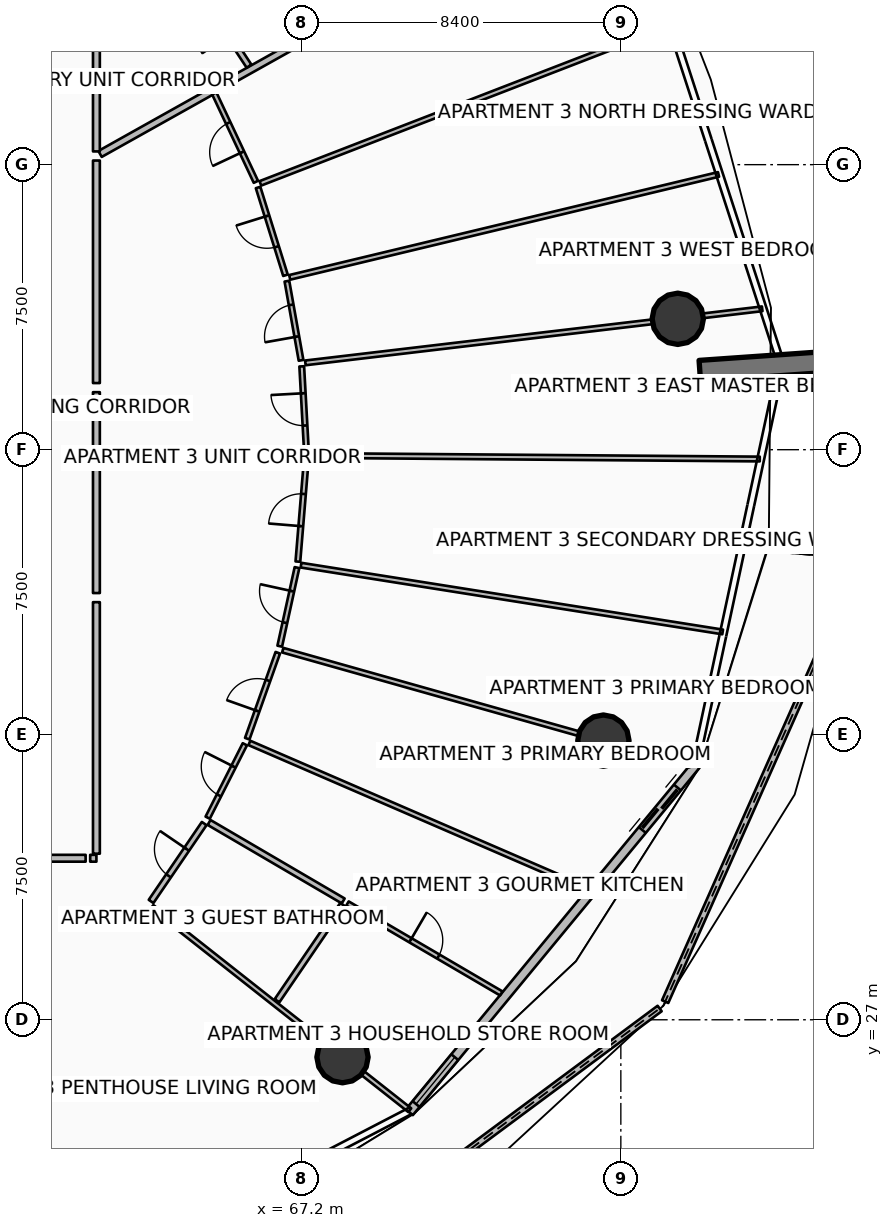
"""IFC4 building model, lengths in metres.
Left out: names, types, materials, properties, quantities, classifications, styles, units other than length and angle.
Written with IfcOpenShell. Run it as: python <this file> out.ifc"""

import sys

from ifc_helpers import new_model, si_unit, direction, frame, frame_2d, origin, origin_2d, place, context, subcontext, project, spatial, polyline, rectangle, circle, outline, extrude, element, fill, save


model = new_model("IFC4")
c1 = context("Model", 3, precision=1e-05, world=origin(), true_north=direction((0.0, 1.0)))
c2 = subcontext(c1, "Body", "Model", "MODEL_VIEW")
j1 = project(units=[si_unit("LENGTHUNIT", "METRE"), si_unit("PLANEANGLEUNIT", "RADIAN")], contexts=[c1])
p1 = place(None, origin())
s1 = spatial("IfcSite", under=j1, at=p1, CompositionType="ELEMENT")
p2 = place(p1, origin())
s2 = spatial("IfcBuilding", under=s1, at=p2, CompositionType="ELEMENT")
p3 = place(p2, frame((0.0, 0.0, 60.15)))
s3 = spatial("IfcBuildingStorey", under=s2, at=p3, CompositionType="ELEMENT", Elevation=60.15)
p4 = place(p3, frame((77.678, 44.075, 0.0), z_axis=(0.0, 0.0, 1.0), x_axis=(0.997564163539, 0.069754853754, 0.0)))
e1 = element("IfcWall", 1, at=p4, inside=s3, PredefinedType="SOLIDWALL", context=c2, shape_type="SweptSolid", body=[
    extrude(rectangle(XDim=3.5, YDim=0.55, at=frame_2d((1.75, 0.0))), origin(), (0.0, 0.0, 1.0), 3.75),
])
for number, where, z_axis, x_axis in (
    (2, (68.276, 26.016, 0.0), (0.0, 0.0, 1.0), (1.0, 0.0, 0.0)),
    (3, (75.141, 34.345, 0.0), (0.0, 0.0, 1.0), (1.0, 0.0, 0.0)),
    (4, (77.098, 45.444, 0.0), (0.0, 0.0, 1.0), (1.0, 0.0, 0.0)),
):
    element("IfcColumn", number, at=place(p3, frame(where, z_axis=z_axis, x_axis=x_axis)), inside=s3, PredefinedType="COLUMN", context=c2, shape_type="SweptSolid", body=[
        extrude(circle(Radius=0.675, at=origin_2d()), origin(), (0.0, 0.0, 1.0), 3.5),
    ])
p5 = place(p3, frame((66.933, 20.104, 0.0), z_axis=(0.0, 0.0, 1.0), x_axis=(0.802947764501, 0.596049400204, 0.0)))
e5 = element("IfcWall", 5, at=p5, inside=s3, PredefinedType="PARAPET", context=c2, shape_type="SweptSolid", body=[
    extrude(outline(polyline([(0.0, 0.0), (12.065, 0.0), (12.066, 1.832), (6.033, 1.696), (0.0, 1.497), (0.0, 0.0)])), frame((0.0, 0.09, 0.0), z_axis=(0.0, -1.0, 0.0), x_axis=(1.0, 0.0, 0.0)), (0.0, 0.0, 1.0), 0.18),
])
p6 = place(p3, frame((76.766, 27.477, 0.0), z_axis=(0.0, 0.0, 1.0), x_axis=(0.405953542593, 0.91389371442, 0.0)))
e6 = element("IfcWall", 6, at=p6, inside=s3, PredefinedType="PARAPET", context=c2, shape_type="SweptSolid", body=[
    extrude(outline(polyline([(0.0, 0.0), (12.74, 0.0), (12.74, 1.756), (6.37, 1.853), (0.0, 1.832), (0.0, 0.0)])), frame((0.0, 0.09, 0.0), z_axis=(0.0, -1.0, 0.0), x_axis=(1.0, 0.0, 0.0)), (0.0, 0.0, 1.0), 0.18),
])
p7 = place(p3, frame((70.033, 24.567, 0.0), z_axis=(0.0, 0.0, 1.0), x_axis=(0.636674332663, 0.771132799281, 0.0)))
e7 = element("IfcWall", 7, at=p7, inside=s3, PredefinedType="SOLIDWALL", context=c2, shape_type="SweptSolid", body=[
    extrude(rectangle(XDim=11.851, YDim=0.24, at=frame_2d((5.926, 0.0))), origin(), (0.0, 0.0, 1.0), 2.45),
])
p8 = place(p7, frame((9.631, 0.0, 0.0)))
e8 = element("IfcOpeningElement", 8, at=p8, cuts=e7, PredefinedType="OPENING", context=c2, shape_type="SweptSolid", body=[
    extrude(rectangle(XDim=1.45, YDim=2.15, at=frame_2d((0.725, 1.075))), frame((0.0, 0.13, 0.0), z_axis=(0.0, -1.0, 0.0), x_axis=(1.0, 0.0, 0.0)), (0.0, 0.0, 1.0), 0.26),
])
p9 = place(p7, frame((0.28, 0.0, 0.65)))
e9 = element("IfcOpeningElement", 9, at=p9, cuts=e7, PredefinedType="OPENING", context=c2, shape_type="SweptSolid", body=[
    extrude(rectangle(XDim=1.6, YDim=1.5, at=frame_2d((0.8, 0.75))), frame((0.0, 0.13, 0.0), z_axis=(0.0, -1.0, 0.0), x_axis=(1.0, 0.0, 0.0)), (0.0, 0.0, 1.0), 0.26),
])
p10 = place(p3, frame((61.896, 49.782, 0.0), z_axis=(0.0, 0.0, 1.0), x_axis=(0.872493215695, 0.488626225828, 0.0)))
e10 = element("IfcWall", 10, at=p10, inside=s3, PredefinedType="PARTITIONING", context=c2, shape_type="SweptSolid", body=[
    extrude(rectangle(XDim=15.612, YDim=0.18, at=frame_2d((7.806, 0.0))), origin(), (0.0, 0.0, 1.0), 2.867),
])
p11 = place(p3, frame((54.14, 31.25, 0.0), z_axis=(0.0, 0.0, 1.0), x_axis=(1.0, 0.0, 0.0)))
e11 = element("IfcWall", 11, at=p11, inside=s3, PredefinedType="PARTITIONING", context=c2, shape_type="SweptSolid", body=[
    extrude(rectangle(XDim=7.376, YDim=0.18, at=frame_2d((3.688, 0.0))), origin(), (0.0, 0.0, 1.0), 2.867),
])
p12 = place(p11, frame((3.138, 0.0, 0.0)))
e12 = element("IfcOpeningElement", 12, at=p12, cuts=e11, PredefinedType="OPENING", context=c2, shape_type="SweptSolid", body=[
    extrude(rectangle(XDim=1.1, YDim=2.1, at=frame_2d((0.55, 1.05))), frame((0.0, 0.1, 0.0), z_axis=(0.0, -1.0, 0.0), x_axis=(1.0, 0.0, 0.0)), (0.0, 0.0, 1.0), 0.2),
])
p13 = place(p3, frame((61.636, 31.25, 0.0), z_axis=(0.0, 0.0, 1.0), x_axis=(1.0, 0.0, 0.0)))
e13 = element("IfcWall", 13, at=p13, inside=s3, PredefinedType="PARTITIONING", context=c2, shape_type="SweptSolid", body=[
    extrude(rectangle(XDim=0.164, YDim=0.18, at=frame_2d((0.082, 0.0))), origin(), (0.0, 0.0, 1.0), 2.867),
])
p14 = place(p3, frame((61.8, 31.37, 0.0), z_axis=(0.0, 0.0, 1.0), x_axis=(0.0, 1.0, 0.0)))
e14 = element("IfcWall", 14, at=p14, inside=s3, PredefinedType="PARTITIONING", context=c2, shape_type="SweptSolid", body=[
    extrude(rectangle(XDim=6.618, YDim=0.18, at=frame_2d((3.309, 0.0))), origin(), (0.0, 0.0, 1.0), 2.867),
])
p15 = place(p3, frame((63.261, 29.969, 0.0), z_axis=(0.0, 0.0, 1.0), x_axis=(0.78531804627, -0.619092534443, 0.0)))
e15 = element("IfcWall", 15, at=p15, inside=s3, PredefinedType="PARTITIONING", context=c2, shape_type="SweptSolid", body=[
    extrude(rectangle(XDim=8.639, YDim=0.125, at=frame_2d((4.32, 0.0))), origin(), (0.0, 0.0, 1.0), 2.867),
])
p16 = place(p3, frame((63.239, 30.114, 0.0), z_axis=(0.0, 0.0, 1.0), x_axis=(0.563437614894, 0.826158613174, 0.0)))
e16 = element("IfcWall", 16, at=p16, inside=s3, PredefinedType="PARTITIONING", context=c2, shape_type="SweptSolid", body=[
    extrude(rectangle(XDim=2.48, YDim=0.15, at=frame_2d((1.24, 0.0))), origin(), (0.0, 0.0, 1.0), 2.867),
])
p17 = place(p16, frame((0.815, 0.0, 0.0)))
e17 = element("IfcOpeningElement", 17, at=p17, cuts=e16, PredefinedType="OPENING", context=c2, shape_type="SweptSolid", body=[
    extrude(rectangle(XDim=0.85, YDim=2.06, at=frame_2d((0.425, 1.03))), frame((0.0, 0.085, 0.0), z_axis=(0.0, -1.0, 0.0), x_axis=(1.0, 0.0, 0.0)), (0.0, 0.0, 1.0), 0.17),
])
p18 = place(p3, frame((66.553, 27.501, 0.0), z_axis=(0.0, 0.0, 1.0), x_axis=(0.563388764178, 0.826191927095, 0.0)))
e18 = element("IfcWall", 18, at=p18, inside=s3, PredefinedType="PARTITIONING", context=c2, shape_type="SweptSolid", body=[
    extrude(rectangle(XDim=3.063, YDim=0.15, at=frame_2d((1.531, 0.0))), origin(), (0.0, 0.0, 1.0), 2.867),
])
p19 = place(p3, frame((64.765, 32.192, 0.0), z_axis=(0.0, 0.0, 1.0), x_axis=(0.863128698129, -0.504984010109, 0.0)))
e19 = element("IfcWall", 19, at=p19, inside=s3, PredefinedType="PARTITIONING", context=c2, shape_type="SweptSolid", body=[
    extrude(rectangle(XDim=4.09, YDim=0.15, at=frame_2d((2.045, 0.0))), origin(), (0.0, 0.0, 1.0), 2.94),
])
p20 = place(p3, frame((68.407, 30.061, 0.0), z_axis=(0.0, 0.0, 1.0), x_axis=(0.863132370473, -0.504977733214, 0.0)))
e20 = element("IfcWall", 20, at=p20, inside=s3, PredefinedType="PARTITIONING", context=c2, shape_type="SweptSolid", body=[
    extrude(rectangle(XDim=4.689, YDim=0.125, at=frame_2d((2.345, 0.0))), origin(), (0.0, 0.0, 1.0), 2.94),
])
p21 = place(p20, frame((1.919, 0.0, 0.0)))
e21 = element("IfcOpeningElement", 21, at=p21, cuts=e20, PredefinedType="OPENING", context=c2, shape_type="SweptSolid", body=[
    extrude(rectangle(XDim=0.85, YDim=2.06, at=frame_2d((0.425, 1.03))), frame((0.0, 0.073, 0.0), z_axis=(0.0, -1.0, 0.0), x_axis=(1.0, 0.0, 0.0)), (0.0, 0.0, 1.0), 0.145),
])
p22 = place(p3, frame((65.825, 34.285, 0.0), z_axis=(0.0, 0.0, 1.0), x_axis=(0.917721842762, -0.39722363892, 0.0)))
e22 = element("IfcWall", 22, at=p22, inside=s3, PredefinedType="PARTITIONING", context=c2, shape_type="SweptSolid", body=[
    extrude(rectangle(XDim=9.694, YDim=0.125, at=frame_2d((4.847, 0.0))), origin(), (0.0, 0.0, 1.0), 2.94),
])
p23 = place(p3, frame((64.728, 32.317, 0.0), z_axis=(0.0, 0.0, 1.0), x_axis=(0.451897802863, 0.892069714634, 0.0)))
e23 = element("IfcWall", 23, at=p23, inside=s3, PredefinedType="PARTITIONING", context=c2, shape_type="SweptSolid", body=[
    extrude(rectangle(XDim=2.165, YDim=0.125, at=frame_2d((1.083, 0.0))), origin(), (0.0, 0.0, 1.0), 2.94),
])
p24 = place(p23, frame((0.658, 0.0, 0.0)))
e24 = element("IfcOpeningElement", 24, at=p24, cuts=e23, PredefinedType="OPENING", context=c2, shape_type="SweptSolid", body=[
    extrude(rectangle(XDim=0.85, YDim=2.06, at=frame_2d((0.425, 1.03))), frame((0.0, 0.073, 0.0), z_axis=(0.0, -1.0, 0.0), x_axis=(1.0, 0.0, 0.0)), (0.0, 0.0, 1.0), 0.145),
])
p25 = place(p3, frame((65.769, 34.396, 0.0), z_axis=(0.0, 0.0, 1.0), x_axis=(0.335079884685, 0.942189721277, 0.0)))
e25 = element("IfcWall", 25, at=p25, inside=s3, PredefinedType="PARTITIONING", context=c2, shape_type="SweptSolid", body=[
    extrude(rectangle(XDim=2.401, YDim=0.125, at=frame_2d((1.2, 0.0))), origin(), (0.0, 0.0, 1.0), 2.867),
])
p26 = place(p25, frame((0.775, 0.0, 0.0)))
e26 = element("IfcOpeningElement", 26, at=p26, cuts=e25, PredefinedType="OPENING", context=c2, shape_type="SweptSolid", body=[
    extrude(rectangle(XDim=0.85, YDim=2.06, at=frame_2d((0.425, 1.03))), frame((0.0, 0.073, 0.0), z_axis=(0.0, -1.0, 0.0), x_axis=(1.0, 0.0, 0.0)), (0.0, 0.0, 1.0), 0.145),
])
p27 = place(p3, frame((61.8, 38.228, 0.0), z_axis=(0.0, 0.0, 1.0), x_axis=(0.0, 1.0, 0.0)))
e27 = element("IfcWall", 27, at=p27, inside=s3, PredefinedType="PARTITIONING", context=c2, shape_type="SweptSolid", body=[
    extrude(rectangle(XDim=5.285, YDim=0.18, at=frame_2d((2.643, 0.0))), origin(), (0.0, 0.0, 1.0), 2.867),
])
p28 = place(p3, frame((66.703, 36.725, 0.0), z_axis=(0.0, 0.0, 1.0), x_axis=(0.962456868727, -0.271434662195, 0.0)))
e28 = element("IfcWall", 28, at=p28, inside=s3, PredefinedType="PARTITIONING", context=c2, shape_type="SweptSolid", body=[
    extrude(rectangle(XDim=11.141, YDim=0.125, at=frame_2d((5.571, 0.0))), origin(), (0.0, 0.0, 1.0), 2.867),
])
p29 = place(p3, frame((67.184, 38.962, 0.0), z_axis=(0.0, 0.0, 1.0), x_axis=(0.987685842404, -0.156450237182, 0.0)))
e29 = element("IfcWall", 29, at=p29, inside=s3, PredefinedType="PARTITIONING", context=c2, shape_type="SweptSolid", body=[
    extrude(rectangle(XDim=11.234, YDim=0.125, at=frame_2d((5.617, 0.0))), origin(), (0.0, 0.0, 1.0), 2.94),
])
p30 = place(p3, frame((67.422, 41.847, 0.0), z_axis=(0.0, 0.0, 1.0), x_axis=(0.999969106173, -0.007860451618, 0.0)))
e30 = element("IfcWall", 30, at=p30, inside=s3, PredefinedType="PARTITIONING", context=c2, shape_type="SweptSolid", body=[
    extrude(rectangle(XDim=11.833, YDim=0.125, at=frame_2d((5.917, 0.0))), origin(), (0.0, 0.0, 1.0), 2.94),
])
p31 = place(p3, frame((66.624, 36.83, 0.0), z_axis=(0.0, 0.0, 1.0), x_axis=(0.214316036982, 0.976764370917, 0.0)))
e31 = element("IfcWall", 31, at=p31, inside=s3, PredefinedType="PARTITIONING", context=c2, shape_type="SweptSolid", body=[
    extrude(rectangle(XDim=2.116, YDim=0.125, at=frame_2d((1.058, 0.0))), origin(), (0.0, 0.0, 1.0), 2.867),
])
p32 = place(p31, frame((0.633, 0.0, 0.0)))
e32 = element("IfcOpeningElement", 32, at=p32, cuts=e31, PredefinedType="OPENING", context=c2, shape_type="SweptSolid", body=[
    extrude(rectangle(XDim=0.85, YDim=2.06, at=frame_2d((0.425, 1.03))), frame((0.0, 0.073, 0.0), z_axis=(0.0, -1.0, 0.0), x_axis=(1.0, 0.0, 0.0)), (0.0, 0.0, 1.0), 0.145),
])
p33 = place(p3, frame((67.102, 39.055, 0.0), z_axis=(0.0, 0.0, 1.0), x_axis=(0.082325550285, 0.996605490538, 0.0)))
e33 = element("IfcWall", 33, at=p33, inside=s3, PredefinedType="PARTITIONING", context=c2, shape_type="SweptSolid", body=[
    extrude(rectangle(XDim=2.722, YDim=0.125, at=frame_2d((1.361, 0.0))), origin(), (0.0, 0.0, 1.0), 2.94),
])
p34 = place(p33, frame((0.936, 0.0, 0.0)))
e34 = element("IfcOpeningElement", 34, at=p34, cuts=e33, PredefinedType="OPENING", context=c2, shape_type="SweptSolid", body=[
    extrude(rectangle(XDim=0.85, YDim=2.06, at=frame_2d((0.425, 1.03))), frame((0.0, 0.073, 0.0), z_axis=(0.0, -1.0, 0.0), x_axis=(1.0, 0.0, 0.0)), (0.0, 0.0, 1.0), 0.145),
])
p35 = place(p3, frame((67.328, 41.928, 0.0), z_axis=(0.0, 0.0, 1.0), x_axis=(-0.054903584575, 0.998491660657, 0.0)))
e35 = element("IfcWall", 35, at=p35, inside=s3, PredefinedType="PARTITIONING", context=c2, shape_type="SweptSolid", body=[
    extrude(rectangle(XDim=2.268, YDim=0.125, at=frame_2d((1.134, 0.0))), origin(), (0.0, 0.0, 1.0), 2.867),
])
p36 = place(p35, frame((0.709, 0.0, 0.0)))
e36 = element("IfcOpeningElement", 36, at=p36, cuts=e35, PredefinedType="OPENING", context=c2, shape_type="SweptSolid", body=[
    extrude(rectangle(XDim=0.85, YDim=2.06, at=frame_2d((0.425, 1.03))), frame((0.0, 0.073, 0.0), z_axis=(0.0, -1.0, 0.0), x_axis=(1.0, 0.0, 0.0)), (0.0, 0.0, 1.0), 0.145),
])
p37 = place(p3, frame((61.8, 43.753, 0.0), z_axis=(0.0, 0.0, 1.0), x_axis=(0.0, 1.0, 0.0)))
e37 = element("IfcWall", 37, at=p37, inside=s3, PredefinedType="PARTITIONING", context=c2, shape_type="SweptSolid", body=[
    extrude(rectangle(XDim=5.855, YDim=0.18, at=frame_2d((2.927, 0.0))), origin(), (0.0, 0.0, 1.0), 2.867),
])
p38 = place(p3, frame((67.298, 44.284, 0.0), z_axis=(0.0, 0.0, 1.0), x_axis=(0.993068589749, 0.117536275483, 0.0)))
e38 = element("IfcWall", 38, at=p38, inside=s3, PredefinedType="PARTITIONING", context=c2, shape_type="SweptSolid", body=[
    extrude(rectangle(XDim=12.106, YDim=0.125, at=frame_2d((6.053, 0.0))), origin(), (0.0, 0.0, 1.0), 2.867),
])
p39 = place(p3, frame((66.886, 46.534, 0.0), z_axis=(0.0, 0.0, 1.0), x_axis=(0.972368393799, 0.233451722507, 0.0)))
e39 = element("IfcWall", 39, at=p39, inside=s3, PredefinedType="PARTITIONING", context=c2, shape_type="SweptSolid", body=[
    extrude(rectangle(XDim=11.605, YDim=0.125, at=frame_2d((5.802, 0.0))), origin(), (0.0, 0.0, 1.0), 2.94),
])
p40 = place(p3, frame((66.115, 49.008, 0.0), z_axis=(0.0, 0.0, 1.0), x_axis=(0.932641955578, 0.360803246514, 0.0)))
e40 = element("IfcWall", 40, at=p40, inside=s3, PredefinedType="PARTITIONING", context=c2, shape_type="SweptSolid", body=[
    extrude(rectangle(XDim=11.556, YDim=0.125, at=frame_2d((5.778, 0.0))), origin(), (0.0, 0.0, 1.0), 2.94),
])
p41 = place(p3, frame((67.185, 44.351, 0.0), z_axis=(0.0, 0.0, 1.0), x_axis=(-0.175726743029, 0.984438983271, 0.0)))
e41 = element("IfcWall", 41, at=p41, inside=s3, PredefinedType="PARTITIONING", context=c2, shape_type="SweptSolid", body=[
    extrude(rectangle(XDim=2.116, YDim=0.125, at=frame_2d((1.058, 0.0))), origin(), (0.0, 0.0, 1.0), 2.867),
])
p42 = place(p41, frame((0.633, 0.0, 0.0)))
e42 = element("IfcOpeningElement", 42, at=p42, cuts=e41, PredefinedType="OPENING", context=c2, shape_type="SweptSolid", body=[
    extrude(rectangle(XDim=0.85, YDim=2.06, at=frame_2d((0.425, 1.03))), frame((0.0, 0.073, 0.0), z_axis=(0.0, -1.0, 0.0), x_axis=(1.0, 0.0, 0.0)), (0.0, 0.0, 1.0), 0.145),
])
p43 = place(p3, frame((66.775, 46.59, 0.0), z_axis=(0.0, 0.0, 1.0), x_axis=(-0.297792299564, 0.954630685826, 0.0)))
e43 = element("IfcWall", 43, at=p43, inside=s3, PredefinedType="PARTITIONING", context=c2, shape_type="SweptSolid", body=[
    extrude(rectangle(XDim=2.419, YDim=0.125, at=frame_2d((1.21, 0.0))), origin(), (0.0, 0.0, 1.0), 2.94),
])
p44 = place(p43, frame((0.785, 0.0, 0.0)))
e44 = element("IfcOpeningElement", 44, at=p44, cuts=e43, PredefinedType="OPENING", context=c2, shape_type="SweptSolid", body=[
    extrude(rectangle(XDim=0.85, YDim=2.06, at=frame_2d((0.425, 1.03))), frame((0.0, 0.073, 0.0), z_axis=(0.0, -1.0, 0.0), x_axis=(1.0, 0.0, 0.0)), (0.0, 0.0, 1.0), 0.145),
])
p45 = place(p3, frame((65.997, 49.048, 0.0), z_axis=(0.0, 0.0, 1.0), x_axis=(-0.425774166793, 0.904829463983, 0.0)))
e45 = element("IfcWall", 45, at=p45, inside=s3, PredefinedType="PARTITIONING", context=c2, shape_type="SweptSolid", body=[
    extrude(rectangle(XDim=2.571, YDim=0.125, at=frame_2d((1.285, 0.0))), origin(), (0.0, 0.0, 1.0), 2.867),
])
p46 = place(p45, frame((0.86, 0.0, 0.0)))
e46 = element("IfcOpeningElement", 46, at=p46, cuts=e45, PredefinedType="OPENING", context=c2, shape_type="SweptSolid", body=[
    extrude(rectangle(XDim=0.85, YDim=2.06, at=frame_2d((0.425, 1.03))), frame((0.0, 0.073, 0.0), z_axis=(0.0, -1.0, 0.0), x_axis=(1.0, 0.0, 0.0)), (0.0, 0.0, 1.0), 0.145),
])
p47 = place(p3, frame((61.8, 49.848, 0.0), z_axis=(0.0, 0.0, 1.0), x_axis=(0.0, 1.0, 0.0)))
e47 = element("IfcWall", 47, at=p47, inside=s3, PredefinedType="PARTITIONING", context=c2, shape_type="SweptSolid", body=[
    extrude(rectangle(XDim=2.781, YDim=0.18, at=frame_2d((1.391, 0.0))), origin(), (0.0, 0.0, 1.0), 2.867),
])
p48 = place(p3, frame((65.816, 52.092, 0.0), z_axis=(0.0, 0.0, 1.0), x_axis=(-0.550532146696, 0.834813964578, 0.0)))
e48 = element("IfcWall", 48, at=p48, inside=s3, PredefinedType="PARTITIONING", context=c2, shape_type="SweptSolid", body=[
    extrude(rectangle(XDim=2.776, YDim=0.15, at=frame_2d((1.388, 0.0))), origin(), (0.0, 0.0, 1.0), 2.867),
])
p49 = place(p48, frame((0.963, 0.0, 0.0)))
e49 = element("IfcOpeningElement", 49, at=p49, cuts=e48, PredefinedType="OPENING", context=c2, shape_type="SweptSolid", body=[
    extrude(rectangle(XDim=0.85, YDim=2.06, at=frame_2d((0.425, 1.03))), frame((0.0, 0.085, 0.0), z_axis=(0.0, -1.0, 0.0), x_axis=(1.0, 0.0, 0.0)), (0.0, 0.0, 1.0), 0.17),
])
p50 = place(p8, origin())
e50 = element("IfcDoor", 50, at=p50, inside=s3, OperationType="DOUBLE_DOOR_SLIDING", PredefinedType="DOOR", context=c2, shape_type="SweptSolid", body=[
    extrude(rectangle(XDim=1.45, YDim=2.15, at=frame_2d((0.725, 1.075))), frame((0.0, 0.025, 0.0), z_axis=(0.0, -1.0, 0.0), x_axis=(1.0, 0.0, 0.0)), (0.0, 0.0, 1.0), 0.05),
])
fill(e8, e50)
p51 = place(p9, origin())
e51 = element("IfcWindow", 51, at=p51, inside=s3, PartitioningType="SINGLE_PANEL", PredefinedType="WINDOW", context=c2, shape_type="SweptSolid", body=[
    extrude(rectangle(XDim=1.6, YDim=1.5, at=frame_2d((0.8, 0.75))), frame((0.0, 0.03, 0.0), z_axis=(0.0, -1.0, 0.0), x_axis=(1.0, 0.0, 0.0)), (0.0, 0.0, 1.0), 0.06),
])
fill(e9, e51)
p52 = place(p17, origin())
e52 = element("IfcDoor", 52, at=p52, inside=s3, OperationType="SINGLE_SWING_RIGHT", PredefinedType="DOOR", context=c2, shape_type="SweptSolid", body=[
    extrude(rectangle(XDim=0.85, YDim=2.06, at=frame_2d((0.425, 1.03))), frame((0.0, 0.025, 0.0), z_axis=(0.0, -1.0, 0.0), x_axis=(1.0, 0.0, 0.0)), (0.0, 0.0, 1.0), 0.05),
])
fill(e17, e52)
p53 = place(p21, origin())
e53 = element("IfcDoor", 53, at=p53, inside=s3, OperationType="SINGLE_SWING_LEFT", PredefinedType="DOOR", context=c2, shape_type="SweptSolid", body=[
    extrude(rectangle(XDim=0.85, YDim=2.06, at=frame_2d((0.425, 1.03))), frame((0.0, 0.025, 0.0), z_axis=(0.0, -1.0, 0.0), x_axis=(1.0, 0.0, 0.0)), (0.0, 0.0, 1.0), 0.05),
])
fill(e21, e53)
p54 = place(p24, origin())
e54 = element("IfcDoor", 54, at=p54, inside=s3, OperationType="SINGLE_SWING_RIGHT", PredefinedType="DOOR", context=c2, shape_type="SweptSolid", body=[
    extrude(rectangle(XDim=0.85, YDim=2.06, at=frame_2d((0.425, 1.03))), frame((0.0, 0.025, 0.0), z_axis=(0.0, -1.0, 0.0), x_axis=(1.0, 0.0, 0.0)), (0.0, 0.0, 1.0), 0.05),
])
fill(e24, e54)
p55 = place(p26, origin())
e55 = element("IfcDoor", 55, at=p55, inside=s3, OperationType="SINGLE_SWING_LEFT", PredefinedType="DOOR", context=c2, shape_type="SweptSolid", body=[
    extrude(rectangle(XDim=0.85, YDim=2.06, at=frame_2d((0.425, 1.03))), frame((0.0, 0.025, 0.0), z_axis=(0.0, -1.0, 0.0), x_axis=(1.0, 0.0, 0.0)), (0.0, 0.0, 1.0), 0.05),
])
fill(e26, e55)
p56 = place(p32, origin())
e56 = element("IfcDoor", 56, at=p56, inside=s3, OperationType="SINGLE_SWING_RIGHT", PredefinedType="DOOR", context=c2, shape_type="SweptSolid", body=[
    extrude(rectangle(XDim=0.85, YDim=2.06, at=frame_2d((0.425, 1.03))), frame((0.0, 0.025, 0.0), z_axis=(0.0, -1.0, 0.0), x_axis=(1.0, 0.0, 0.0)), (0.0, 0.0, 1.0), 0.05),
])
fill(e32, e56)
p57 = place(p34, origin())
e57 = element("IfcDoor", 57, at=p57, inside=s3, OperationType="SINGLE_SWING_LEFT", PredefinedType="DOOR", context=c2, shape_type="SweptSolid", body=[
    extrude(rectangle(XDim=0.85, YDim=2.06, at=frame_2d((0.425, 1.03))), frame((0.0, 0.025, 0.0), z_axis=(0.0, -1.0, 0.0), x_axis=(1.0, 0.0, 0.0)), (0.0, 0.0, 1.0), 0.05),
])
fill(e34, e57)
p58 = place(p36, origin())
e58 = element("IfcDoor", 58, at=p58, inside=s3, OperationType="SINGLE_SWING_RIGHT", PredefinedType="DOOR", context=c2, shape_type="SweptSolid", body=[
    extrude(rectangle(XDim=0.85, YDim=2.06, at=frame_2d((0.425, 1.03))), frame((0.0, 0.025, 0.0), z_axis=(0.0, -1.0, 0.0), x_axis=(1.0, 0.0, 0.0)), (0.0, 0.0, 1.0), 0.05),
])
fill(e36, e58)
p59 = place(p42, origin())
e59 = element("IfcDoor", 59, at=p59, inside=s3, OperationType="SINGLE_SWING_LEFT", PredefinedType="DOOR", context=c2, shape_type="SweptSolid", body=[
    extrude(rectangle(XDim=0.85, YDim=2.06, at=frame_2d((0.425, 1.03))), frame((0.0, 0.025, 0.0), z_axis=(0.0, -1.0, 0.0), x_axis=(1.0, 0.0, 0.0)), (0.0, 0.0, 1.0), 0.05),
])
fill(e42, e59)
p60 = place(p44, origin())
e60 = element("IfcDoor", 60, at=p60, inside=s3, OperationType="SINGLE_SWING_RIGHT", PredefinedType="DOOR", context=c2, shape_type="SweptSolid", body=[
    extrude(rectangle(XDim=0.85, YDim=2.06, at=frame_2d((0.425, 1.03))), frame((0.0, 0.025, 0.0), z_axis=(0.0, -1.0, 0.0), x_axis=(1.0, 0.0, 0.0)), (0.0, 0.0, 1.0), 0.05),
])
fill(e44, e60)
p61 = place(p46, origin())
e61 = element("IfcDoor", 61, at=p61, inside=s3, OperationType="SINGLE_SWING_LEFT", PredefinedType="DOOR", context=c2, shape_type="SweptSolid", body=[
    extrude(rectangle(XDim=0.85, YDim=2.06, at=frame_2d((0.425, 1.03))), frame((0.0, 0.025, 0.0), z_axis=(0.0, -1.0, 0.0), x_axis=(1.0, 0.0, 0.0)), (0.0, 0.0, 1.0), 0.05),
])
fill(e46, e61)
save(model, sys.argv[1])
